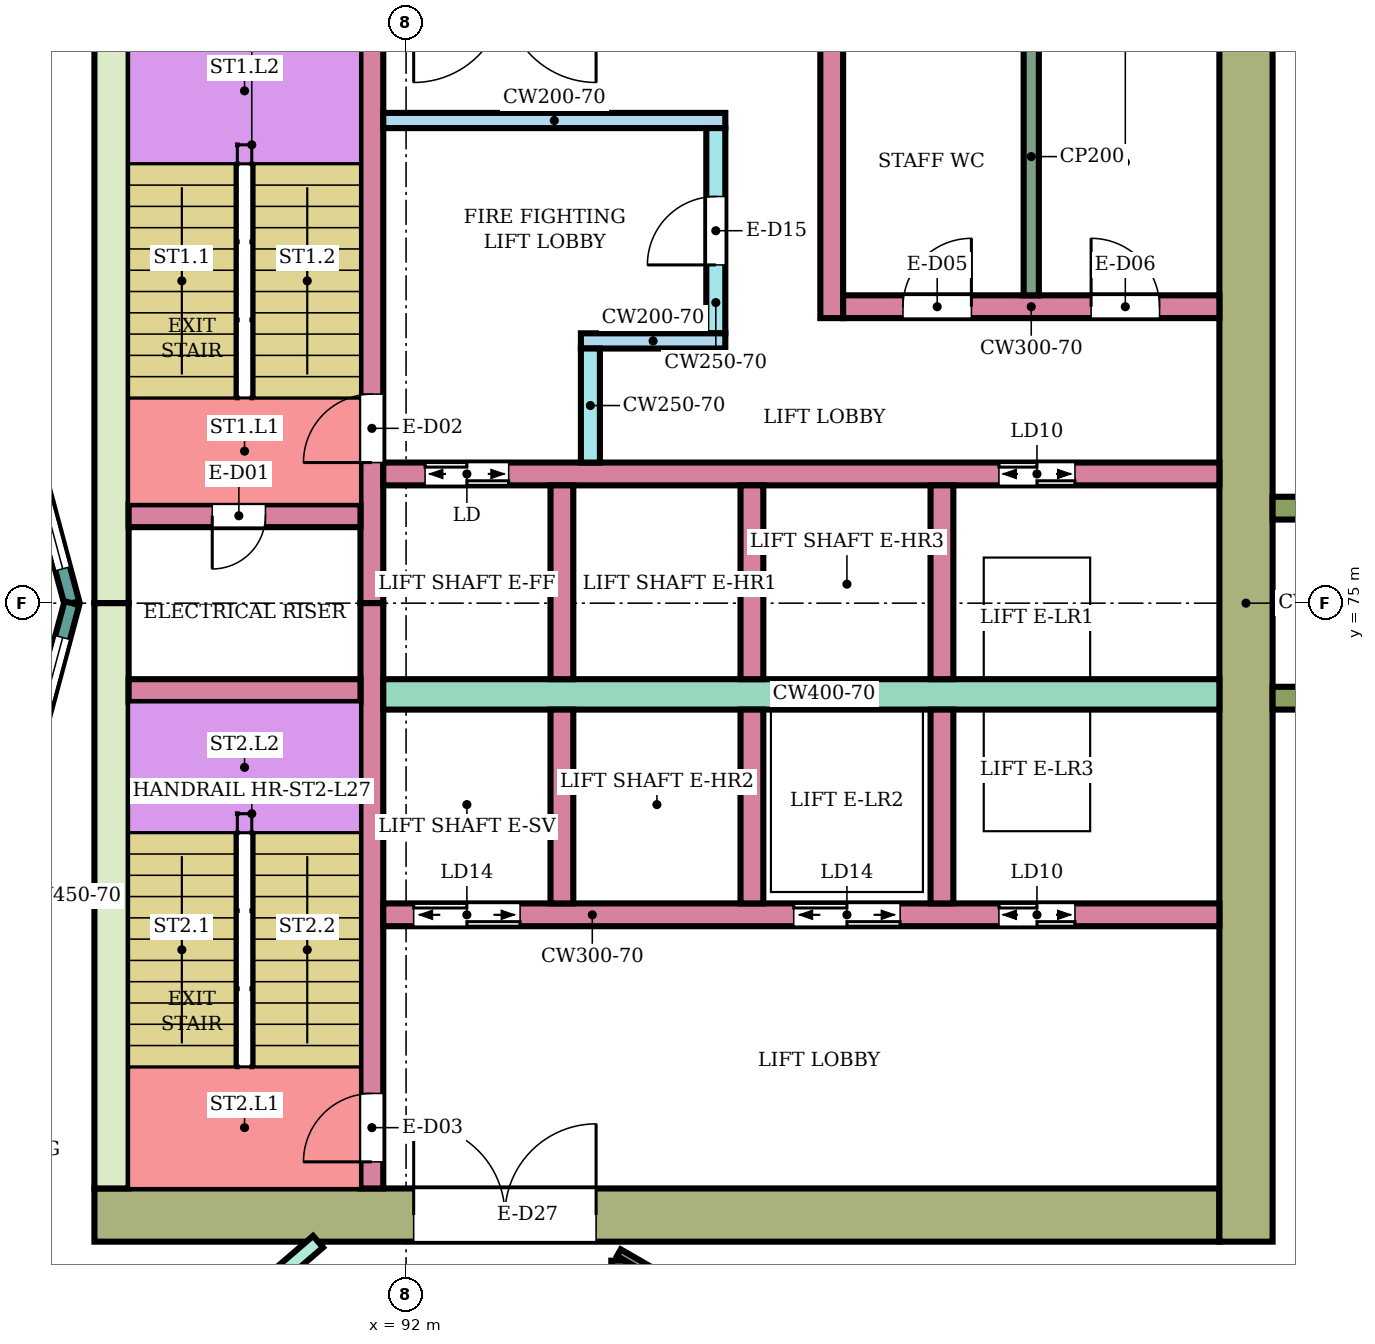
"""IFC4 building model, lengths in metres.
Left out: names, types, materials, properties, quantities, classifications, styles, units other than length and angle.
Written with IfcOpenShell. Run it as: python <this file> out.ifc"""

import sys

from ifc_helpers import new_model, si_unit, direction, frame, frame_2d, origin, place, context, subcontext, project, spatial, rectangle, extrude, element, fill, save


model = new_model("IFC4")
c1 = context("Model", 3, precision=1e-05, world=origin(), true_north=direction((0.0, 1.0)))
c2 = subcontext(c1, "Body", "Model", "MODEL_VIEW")
j1 = project(units=[si_unit("LENGTHUNIT", "METRE"), si_unit("PLANEANGLEUNIT", "RADIAN")], contexts=[c1])
p1 = place(None, origin())
s1 = spatial("IfcSite", under=j1, at=p1, CompositionType="ELEMENT")
p2 = place(p1, origin())
s2 = spatial("IfcBuilding", under=s1, at=p2, CompositionType="ELEMENT")
p3 = place(p2, frame((0.0, 0.0, 118.5)))
s3 = spatial("IfcBuildingStorey", under=s2, at=p3, CompositionType="ELEMENT", Elevation=118.5)
p4 = place(p3, frame((87.9, 66.95, 0.0), z_axis=(0.0, 0.0, 1.0), x_axis=(1.0, 0.0, 0.0)))
e1 = element("IfcWall", 1, at=p4, inside=s3, PredefinedType="SHEAR", context=c2, shape_type="SweptSolid", body=[
    extrude(rectangle(XDim=14.8, YDim=0.7, at=frame_2d((7.4, 0.0))), origin(), (0.0, 0.0, 1.0), 3.58),
])
p5 = place(p4, frame((4.2, 0.0, 0.0)))
e2 = element("IfcOpeningElement", 2, at=p5, cuts=e1, PredefinedType="OPENING", context=c2, shape_type="SweptSolid", body=[
    extrude(rectangle(XDim=2.4, YDim=2.4, at=frame_2d((1.2, 1.2))), frame((0.0, 0.36, 0.0), z_axis=(0.0, -1.0, 0.0), x_axis=(1.0, 0.0, 0.0)), (0.0, 0.0, 1.0), 0.72),
])
for number, where, z_axis, x_axis in (
    (3, (88.125, 75.0, 0.0), (0.0, 0.0, 1.0), (0.0, 1.0, 0.0)),
    (4, (88.125, 67.3, 0.0), (0.0, 0.0, 1.0), (0.0, 1.0, 0.0)),
):
    element("IfcWall", number, at=place(p3, frame(where, z_axis=z_axis, x_axis=x_axis)), inside=s3, PredefinedType="SHEAR", context=c2, shape_type="SweptSolid", body=[
        extrude(rectangle(XDim=7.7, YDim=0.45, at=frame_2d((3.85, 0.0))), origin(), (0.0, 0.0, 1.0), 3.58),
    ])
p6 = place(p3, frame((103.05, 66.6, 0.0), z_axis=(0.0, 0.0, 1.0), x_axis=(0.0, 1.0, 0.0)))
e5 = element("IfcWall", 5, at=p6, inside=s3, PredefinedType="SHEAR", context=c2, shape_type="SweptSolid", body=[
    extrude(rectangle(XDim=16.8, YDim=0.7, at=frame_2d((8.4, 0.0))), origin(), (0.0, 0.0, 1.0), 3.58),
])
p7 = place(p3, frame((91.55, 75.0, 0.0), z_axis=(0.0, 0.0, 1.0), x_axis=(0.0, 1.0, 0.0)))
e6 = element("IfcWall", 6, at=p7, inside=s3, PredefinedType="SHEAR", context=c2, shape_type="SweptSolid", body=[
    extrude(rectangle(XDim=7.7, YDim=0.3, at=frame_2d((3.85, 0.0))), origin(), (0.0, 0.0, 1.0), 3.58),
])
p8 = place(p7, frame((1.85, 0.0, 0.0)))
e7 = element("IfcOpeningElement", 7, at=p8, cuts=e6, PredefinedType="OPENING", context=c2, shape_type="SweptSolid", body=[
    extrude(rectangle(XDim=0.9, YDim=2.1, at=frame_2d((0.45, 1.05))), frame((0.0, 0.16, 0.0), z_axis=(0.0, -1.0, 0.0), x_axis=(1.0, 0.0, 0.0)), (0.0, 0.0, 1.0), 0.32),
])
p9 = place(p3, frame((91.55, 67.3, 0.0), z_axis=(0.0, 0.0, 1.0), x_axis=(0.0, 1.0, 0.0)))
e8 = element("IfcWall", 8, at=p9, inside=s3, PredefinedType="SHEAR", context=c2, shape_type="SweptSolid", body=[
    extrude(rectangle(XDim=7.7, YDim=0.3, at=frame_2d((3.85, 0.0))), origin(), (0.0, 0.0, 1.0), 3.58),
])
p10 = place(p9, frame((0.35, 0.0, 0.0)))
e9 = element("IfcOpeningElement", 9, at=p10, cuts=e8, PredefinedType="OPENING", context=c2, shape_type="SweptSolid", body=[
    extrude(rectangle(XDim=0.9, YDim=2.1, at=frame_2d((0.45, 1.05))), frame((0.0, 0.16, 0.0), z_axis=(0.0, -1.0, 0.0), x_axis=(1.0, 0.0, 0.0)), (0.0, 0.0, 1.0), 0.32),
])
p11 = place(p3, frame((88.35, 76.15, 0.0), z_axis=(0.0, 0.0, 1.0), x_axis=(1.0, 0.0, 0.0)))
e10 = element("IfcWall", 10, at=p11, inside=s3, PredefinedType="SHEAR", context=c2, shape_type="SweptSolid", body=[
    extrude(rectangle(XDim=3.05, YDim=0.3, at=frame_2d((1.525, 0.0))), origin(), (0.0, 0.0, 1.0), 3.58),
])
p12 = place(p11, frame((1.1, 0.0, 0.0)))
e11 = element("IfcOpeningElement", 11, at=p12, cuts=e10, PredefinedType="OPENING", context=c2, shape_type="SweptSolid", body=[
    extrude(rectangle(XDim=0.7, YDim=2.0, at=frame_2d((0.35, 1.0))), frame((0.0, 0.16, 0.0), z_axis=(0.0, -1.0, 0.0), x_axis=(1.0, 0.0, 0.0)), (0.0, 0.0, 1.0), 0.32),
])
p13 = place(p3, frame((88.35, 73.85, 0.0), z_axis=(0.0, 0.0, 1.0), x_axis=(1.0, 0.0, 0.0)))
e12 = element("IfcWall", 12, at=p13, inside=s3, PredefinedType="SHEAR", context=c2, shape_type="SweptSolid", body=[
    extrude(rectangle(XDim=3.05, YDim=0.3, at=frame_2d((1.525, 0.0))), origin(), (0.0, 0.0, 1.0), 3.58),
])
p14 = place(p3, frame((91.7, 76.7, 0.0), z_axis=(0.0, 0.0, 1.0), x_axis=(1.0, 0.0, 0.0)))
e13 = element("IfcWall", 13, at=p14, inside=s3, PredefinedType="SHEAR", context=c2, shape_type="SweptSolid", body=[
    extrude(rectangle(XDim=11.0, YDim=0.3, at=frame_2d((5.5, 0.0))), origin(), (0.0, 0.0, 1.0), 3.58),
])
p15 = place(p14, frame((0.55, 0.0, 0.0)))
e14 = element("IfcOpeningElement", 14, at=p15, cuts=e13, PredefinedType="OPENING", context=c2, shape_type="SweptSolid", body=[
    extrude(rectangle(XDim=1.1, YDim=2.1, at=frame_2d((0.55, 1.05))), frame((0.0, 0.16, 0.0), z_axis=(0.0, -1.0, 0.0), x_axis=(1.0, 0.0, 0.0)), (0.0, 0.0, 1.0), 0.32),
])
p16 = place(p14, frame((8.1, 0.0, 0.0)))
e15 = element("IfcOpeningElement", 15, at=p16, cuts=e13, PredefinedType="OPENING", context=c2, shape_type="SweptSolid", body=[
    extrude(rectangle(XDim=1.0, YDim=2.1, at=frame_2d((0.5, 1.05))), frame((0.0, 0.16, 0.0), z_axis=(0.0, -1.0, 0.0), x_axis=(1.0, 0.0, 0.0)), (0.0, 0.0, 1.0), 0.32),
])
p17 = place(p3, frame((91.7, 73.8, 0.0), z_axis=(0.0, 0.0, 1.0), x_axis=(1.0, 0.0, 0.0)))
e16 = element("IfcWall", 16, at=p17, inside=s3, PredefinedType="SHEAR", context=c2, shape_type="SweptSolid", body=[
    extrude(rectangle(XDim=11.0, YDim=0.4, at=frame_2d((5.5, 0.0))), origin(), (0.0, 0.0, 1.0), 3.58),
])
p18 = place(p3, frame((91.7, 70.9, 0.0), z_axis=(0.0, 0.0, 1.0), x_axis=(1.0, 0.0, 0.0)))
e17 = element("IfcWall", 17, at=p18, inside=s3, PredefinedType="SHEAR", context=c2, shape_type="SweptSolid", body=[
    extrude(rectangle(XDim=11.0, YDim=0.3, at=frame_2d((5.5, 0.0))), origin(), (0.0, 0.0, 1.0), 3.58),
])
p19 = place(p18, frame((0.4, 0.0, 0.0)))
e18 = element("IfcOpeningElement", 18, at=p19, cuts=e17, PredefinedType="OPENING", context=c2, shape_type="SweptSolid", body=[
    extrude(rectangle(XDim=1.4, YDim=2.1, at=frame_2d((0.7, 1.05))), frame((0.0, 0.16, 0.0), z_axis=(0.0, -1.0, 0.0), x_axis=(1.0, 0.0, 0.0)), (0.0, 0.0, 1.0), 0.32),
])
p20 = place(p18, frame((5.4, 0.0, 0.0)))
e19 = element("IfcOpeningElement", 19, at=p20, cuts=e17, PredefinedType="OPENING", context=c2, shape_type="SweptSolid", body=[
    extrude(rectangle(XDim=1.4, YDim=2.1, at=frame_2d((0.7, 1.05))), frame((0.0, 0.16, 0.0), z_axis=(0.0, -1.0, 0.0), x_axis=(1.0, 0.0, 0.0)), (0.0, 0.0, 1.0), 0.32),
])
p21 = place(p18, frame((8.1, 0.0, 0.0)))
e20 = element("IfcOpeningElement", 20, at=p21, cuts=e17, PredefinedType="OPENING", context=c2, shape_type="SweptSolid", body=[
    extrude(rectangle(XDim=1.0, YDim=2.1, at=frame_2d((0.5, 1.05))), frame((0.0, 0.16, 0.0), z_axis=(0.0, -1.0, 0.0), x_axis=(1.0, 0.0, 0.0)), (0.0, 0.0, 1.0), 0.32),
])
for number, where, z_axis, x_axis in (
    (21, (94.05, 74.0, 0.0), (0.0, 0.0, 1.0), (0.0, 1.0, 0.0)),
    (22, (96.55, 74.0, 0.0), (0.0, 0.0, 1.0), (0.0, 1.0, 0.0)),
    (23, (99.05, 74.0, 0.0), (0.0, 0.0, 1.0), (0.0, 1.0, 0.0)),
    (24, (94.05, 71.05, 0.0), (0.0, 0.0, 1.0), (0.0, 1.0, 0.0)),
    (25, (96.55, 71.05, 0.0), (0.0, 0.0, 1.0), (0.0, 1.0, 0.0)),
    (26, (99.05, 71.05, 0.0), (0.0, 0.0, 1.0), (0.0, 1.0, 0.0)),
):
    element("IfcWall", number, at=place(p3, frame(where, z_axis=z_axis, x_axis=x_axis)), inside=s3, PredefinedType="SHEAR", context=c2, shape_type="SweptSolid", body=[
        extrude(rectangle(XDim=2.55, YDim=0.3, at=frame_2d((1.275, 0.0))), origin(), (0.0, 0.0, 1.0), 3.58),
    ])
p22 = place(p3, frame((91.7, 81.35, 0.0), z_axis=(0.0, 0.0, 1.0), x_axis=(1.0, 0.0, 0.0)))
e27 = element("IfcWall", 27, at=p22, inside=s3, PredefinedType="SHEAR", context=c2, shape_type="SweptSolid", body=[
    extrude(rectangle(XDim=4.5, YDim=0.2, at=frame_2d((2.25, 0.0))), origin(), (0.0, 0.0, 1.0), 3.58),
])
p23 = place(p3, frame((96.075, 78.55, 0.0), z_axis=(0.0, 0.0, 1.0), x_axis=(0.0, 1.0, 0.0)))
e28 = element("IfcWall", 28, at=p23, inside=s3, PredefinedType="SHEAR", context=c2, shape_type="SweptSolid", body=[
    extrude(rectangle(XDim=2.7, YDim=0.25, at=frame_2d((1.35, 0.0))), origin(), (0.0, 0.0, 1.0), 3.58),
])
p24 = place(p23, frame((0.9, 0.0, 0.0)))
e29 = element("IfcOpeningElement", 29, at=p24, cuts=e28, PredefinedType="OPENING", context=c2, shape_type="SweptSolid", body=[
    extrude(rectangle(XDim=0.9, YDim=2.1, at=frame_2d((0.45, 1.05))), frame((0.0, 0.135, 0.0), z_axis=(0.0, -1.0, 0.0), x_axis=(1.0, 0.0, 0.0)), (0.0, 0.0, 1.0), 0.27),
])
p25 = place(p3, frame((94.3, 78.45, 0.0), z_axis=(0.0, 0.0, 1.0), x_axis=(1.0, 0.0, 0.0)))
e30 = element("IfcWall", 30, at=p25, inside=s3, PredefinedType="SHEAR", context=c2, shape_type="SweptSolid", body=[
    extrude(rectangle(XDim=1.9, YDim=0.2, at=frame_2d((0.95, 0.0))), origin(), (0.0, 0.0, 1.0), 3.58),
])
p26 = place(p3, frame((94.425, 76.85, 0.0), z_axis=(0.0, 0.0, 1.0), x_axis=(0.0, 1.0, 0.0)))
e31 = element("IfcWall", 31, at=p26, inside=s3, PredefinedType="SHEAR", context=c2, shape_type="SweptSolid", body=[
    extrude(rectangle(XDim=1.5, YDim=0.25, at=frame_2d((0.75, 0.0))), origin(), (0.0, 0.0, 1.0), 3.58),
])
p27 = place(p3, frame((97.6, 78.75, 0.0), z_axis=(0.0, 0.0, 1.0), x_axis=(0.0, 1.0, 0.0)))
e32 = element("IfcWall", 32, at=p27, inside=s3, PredefinedType="SHEAR", context=c2, shape_type="SweptSolid", body=[
    extrude(rectangle(XDim=3.95, YDim=0.3, at=frame_2d((1.975, 0.0))), origin(), (0.0, 0.0, 1.0), 3.58),
])
p28 = place(p3, frame((97.75, 78.9, 0.0), z_axis=(0.0, 0.0, 1.0), x_axis=(1.0, 0.0, 0.0)))
e33 = element("IfcWall", 33, at=p28, inside=s3, PredefinedType="SHEAR", context=c2, shape_type="SweptSolid", body=[
    extrude(rectangle(XDim=4.95, YDim=0.3, at=frame_2d((2.475, 0.0))), origin(), (0.0, 0.0, 1.0), 3.58),
])
p29 = place(p28, frame((0.788, 0.0, 0.0)))
e34 = element("IfcOpeningElement", 34, at=p29, cuts=e33, PredefinedType="OPENING", context=c2, shape_type="SweptSolid", body=[
    extrude(rectangle(XDim=0.9, YDim=2.1, at=frame_2d((0.45, 1.05))), frame((0.0, 0.16, 0.0), z_axis=(0.0, -1.0, 0.0), x_axis=(1.0, 0.0, 0.0)), (0.0, 0.0, 1.0), 0.32),
])
p30 = place(p28, frame((3.262, 0.0, 0.0)))
e35 = element("IfcOpeningElement", 35, at=p30, cuts=e33, PredefinedType="OPENING", context=c2, shape_type="SweptSolid", body=[
    extrude(rectangle(XDim=0.9, YDim=2.1, at=frame_2d((0.45, 1.05))), frame((0.0, 0.16, 0.0), z_axis=(0.0, -1.0, 0.0), x_axis=(1.0, 0.0, 0.0)), (0.0, 0.0, 1.0), 0.32),
])
for number, where, z_axis, x_axis in (
    (36, (103.4, 73.75, 0.0), (0.0, 0.0, 1.0), (1.0, 0.0, 0.0)),
    (37, (103.4, 76.25, 0.0), (0.0, 0.0, 1.0), (1.0, 0.0, 0.0)),
):
    element("IfcWall", number, at=place(p3, frame(where, z_axis=z_axis, x_axis=x_axis)), inside=s3, PredefinedType="NOTDEFINED", context=c2, shape_type="SweptSolid", body=[
        extrude(rectangle(XDim=2.416, YDim=0.3, at=frame_2d((1.208, 0.0))), origin(), (0.0, 0.0, 1.0), 3.9),
    ])
p31 = place(p3, frame((87.604, 75.0, 0.0), z_axis=(0.0, 0.0, 1.0), x_axis=(-0.258789828301, 0.965933654434, 0.0)))
e38 = element("IfcWall", 38, at=p31, inside=s3, PredefinedType="NOTDEFINED", context=c2, shape_type="SweptSolid", body=[
    extrude(rectangle(XDim=3.936, YDim=0.2, at=frame_2d((1.968, 0.0))), origin(), (0.0, 0.0, 1.0), 3.9),
])
p32 = place(p31, frame((0.468, 0.0, 0.9)))
e39 = element("IfcOpeningElement", 39, at=p32, cuts=e38, PredefinedType="OPENING", context=c2, shape_type="SweptSolid", body=[
    extrude(rectangle(XDim=3.0, YDim=2.3, at=frame_2d((1.5, 1.15))), frame((0.0, 0.11, 0.0), z_axis=(0.0, -1.0, 0.0), x_axis=(1.0, 0.0, 0.0)), (0.0, 0.0, 1.0), 0.22),
])
p33 = place(p3, frame((86.585, 71.198, 0.0), z_axis=(0.0, 0.0, 1.0), x_axis=(0.258789828301, 0.965933654434, 0.0)))
e40 = element("IfcWall", 40, at=p33, inside=s3, PredefinedType="NOTDEFINED", context=c2, shape_type="SweptSolid", body=[
    extrude(rectangle(XDim=3.936, YDim=0.2, at=frame_2d((1.968, 0.0))), origin(), (0.0, 0.0, 1.0), 3.9),
])
p34 = place(p33, frame((0.468, 0.0, 0.9)))
e41 = element("IfcOpeningElement", 41, at=p34, cuts=e40, PredefinedType="OPENING", context=c2, shape_type="SweptSolid", body=[
    extrude(rectangle(XDim=3.0, YDim=2.3, at=frame_2d((1.5, 1.15))), frame((0.0, 0.11, 0.0), z_axis=(0.0, -1.0, 0.0), x_axis=(1.0, 0.0, 0.0)), (0.0, 0.0, 1.0), 0.22),
])
p35 = place(p3, frame((86.877, 63.189, 0.0), z_axis=(0.0, 0.0, 1.0), x_axis=(0.758075808328, 0.652166442581, 0.0)))
e42 = element("IfcWall", 42, at=p35, inside=s3, PredefinedType="PARTITIONING", context=c2, shape_type="SweptSolid", body=[
    extrude(rectangle(XDim=5.23, YDim=0.2, at=frame_2d((2.615, 0.0))), origin(), (0.0, 0.0, 1.0), 3.45),
])
p36 = place(p35, frame((2.165, 0.0, 0.0)))
e43 = element("IfcOpeningElement", 43, at=p36, cuts=e42, PredefinedType="OPENING", context=c2, shape_type="SweptSolid", body=[
    extrude(rectangle(XDim=0.9, YDim=2.1, at=frame_2d((0.45, 1.05))), frame((0.0, 0.11, 0.0), z_axis=(0.0, -1.0, 0.0), x_axis=(1.0, 0.0, 0.0)), (0.0, 0.0, 1.0), 0.22),
])
p37 = place(p3, frame((94.8, 65.1, 0.0), z_axis=(0.0, 0.0, 1.0), x_axis=(0.0, 1.0, 0.0)))
e44 = element("IfcWall", 44, at=p37, inside=s3, PredefinedType="PARTITIONING", context=c2, shape_type="SweptSolid", body=[
    extrude(rectangle(XDim=1.25, YDim=0.2, at=frame_2d((0.625, 0.0))), origin(), (0.0, 0.0, 1.0), 3.45),
])
p38 = place(p3, frame((94.8, 66.455, 0.0), z_axis=(0.0, 0.0, 1.0), x_axis=(0.86602264145, -0.500004784474, 0.0)))
e45 = element("IfcWall", 45, at=p38, inside=s3, PredefinedType="PARTITIONING", context=c2, shape_type="SweptSolid", body=[
    extrude(rectangle(XDim=8.708, YDim=0.1, at=frame_2d((4.354, 0.0))), origin(), (0.0, 0.0, 1.0), 3.45),
])
p39 = place(p38, frame((3.879, 0.0, 0.0)))
e46 = element("IfcOpeningElement", 46, at=p39, cuts=e45, PredefinedType="OPENING", context=c2, shape_type="SweptSolid", body=[
    extrude(rectangle(XDim=0.9, YDim=2.1, at=frame_2d((0.45, 1.05))), frame((0.0, 0.06, 0.0), z_axis=(0.0, -1.0, 0.0), x_axis=(1.0, 0.0, 0.0)), (0.0, 0.0, 1.0), 0.12),
])
p40 = place(p3, frame((100.225, 79.05, 0.0), z_axis=(0.0, 0.0, 1.0), x_axis=(0.0, 1.0, 0.0)))
e47 = element("IfcWall", 47, at=p40, inside=s3, PredefinedType="PARTITIONING", context=c2, shape_type="SweptSolid", body=[
    extrude(rectangle(XDim=3.65, YDim=0.2, at=frame_2d((1.825, 0.0))), origin(), (0.0, 0.0, 1.0), 3.58),
])
p41 = place(p32, origin())
e48 = element("IfcWindow", 48, at=p41, inside=s3, PartitioningType="SINGLE_PANEL", PredefinedType="WINDOW", context=c2, shape_type="SweptSolid", body=[
    extrude(rectangle(XDim=3.0, YDim=2.3, at=frame_2d((1.5, 1.15))), frame((0.0, 0.03, 0.0), z_axis=(0.0, -1.0, 0.0), x_axis=(1.0, 0.0, 0.0)), (0.0, 0.0, 1.0), 0.06),
])
fill(e39, e48)
p42 = place(p34, origin())
e49 = element("IfcWindow", 49, at=p42, inside=s3, PartitioningType="SINGLE_PANEL", PredefinedType="WINDOW", context=c2, shape_type="SweptSolid", body=[
    extrude(rectangle(XDim=3.0, YDim=2.3, at=frame_2d((1.5, 1.15))), frame((0.0, 0.03, 0.0), z_axis=(0.0, -1.0, 0.0), x_axis=(1.0, 0.0, 0.0)), (0.0, 0.0, 1.0), 0.06),
])
fill(e41, e49)
p43 = place(p12, frame((0.7, 0.0, 0.0), z_axis=(0.0, 0.0, 1.0), x_axis=(-1.0, 0.0, 0.0)))
e50 = element("IfcDoor", 50, at=p43, inside=s3, OperationType="SINGLE_SWING_RIGHT", PredefinedType="DOOR", context=c2, shape_type="SweptSolid", body=[
    extrude(rectangle(XDim=0.7, YDim=2.0, at=frame_2d((0.35, 1.0))), frame((0.0, 0.025, 0.0), z_axis=(0.0, -1.0, 0.0), x_axis=(1.0, 0.0, 0.0)), (0.0, 0.0, 1.0), 0.05),
])
fill(e11, e50)
p44 = place(p8, origin())
e51 = element("IfcDoor", 51, at=p44, inside=s3, OperationType="SINGLE_SWING_LEFT", PredefinedType="DOOR", context=c2, shape_type="SweptSolid", body=[
    extrude(rectangle(XDim=0.9, YDim=2.1, at=frame_2d((0.45, 1.05))), frame((0.0, 0.025, 0.0), z_axis=(0.0, -1.0, 0.0), x_axis=(1.0, 0.0, 0.0)), (0.0, 0.0, 1.0), 0.05),
])
fill(e7, e51)
p45 = place(p10, origin())
e52 = element("IfcDoor", 52, at=p45, inside=s3, OperationType="SINGLE_SWING_LEFT", PredefinedType="DOOR", context=c2, shape_type="SweptSolid", body=[
    extrude(rectangle(XDim=0.9, YDim=2.1, at=frame_2d((0.45, 1.05))), frame((0.0, 0.025, 0.0), z_axis=(0.0, -1.0, 0.0), x_axis=(1.0, 0.0, 0.0)), (0.0, 0.0, 1.0), 0.05),
])
fill(e9, e52)
p46 = place(p15, origin())
e53 = element("IfcDoor", 53, at=p46, inside=s3, OperationType="DOUBLE_DOOR_SLIDING", PredefinedType="DOOR", context=c2, shape_type="SweptSolid", body=[
    extrude(rectangle(XDim=1.1, YDim=2.1, at=frame_2d((0.55, 1.05))), frame((0.0, 0.025, 0.0), z_axis=(0.0, -1.0, 0.0), x_axis=(1.0, 0.0, 0.0)), (0.0, 0.0, 1.0), 0.05),
])
fill(e14, e53)
p47 = place(p16, origin())
e54 = element("IfcDoor", 54, at=p47, inside=s3, OperationType="DOUBLE_DOOR_SLIDING", PredefinedType="DOOR", context=c2, shape_type="SweptSolid", body=[
    extrude(rectangle(XDim=1.0, YDim=2.1, at=frame_2d((0.5, 1.05))), frame((0.0, 0.025, 0.0), z_axis=(0.0, -1.0, 0.0), x_axis=(1.0, 0.0, 0.0)), (0.0, 0.0, 1.0), 0.05),
])
fill(e15, e54)
p48 = place(p19, origin())
e55 = element("IfcDoor", 55, at=p48, inside=s3, OperationType="DOUBLE_DOOR_SLIDING", PredefinedType="DOOR", context=c2, shape_type="SweptSolid", body=[
    extrude(rectangle(XDim=1.4, YDim=2.1, at=frame_2d((0.7, 1.05))), frame((0.0, 0.025, 0.0), z_axis=(0.0, -1.0, 0.0), x_axis=(1.0, 0.0, 0.0)), (0.0, 0.0, 1.0), 0.05),
])
fill(e18, e55)
p49 = place(p20, origin())
e56 = element("IfcDoor", 56, at=p49, inside=s3, OperationType="DOUBLE_DOOR_SLIDING", PredefinedType="DOOR", context=c2, shape_type="SweptSolid", body=[
    extrude(rectangle(XDim=1.4, YDim=2.1, at=frame_2d((0.7, 1.05))), frame((0.0, 0.025, 0.0), z_axis=(0.0, -1.0, 0.0), x_axis=(1.0, 0.0, 0.0)), (0.0, 0.0, 1.0), 0.05),
])
fill(e19, e56)
p50 = place(p21, origin())
e57 = element("IfcDoor", 57, at=p50, inside=s3, OperationType="DOUBLE_DOOR_SLIDING", PredefinedType="DOOR", context=c2, shape_type="SweptSolid", body=[
    extrude(rectangle(XDim=1.0, YDim=2.1, at=frame_2d((0.5, 1.05))), frame((0.0, 0.025, 0.0), z_axis=(0.0, -1.0, 0.0), x_axis=(1.0, 0.0, 0.0)), (0.0, 0.0, 1.0), 0.05),
])
fill(e20, e57)
p51 = place(p24, origin())
e58 = element("IfcDoor", 58, at=p51, inside=s3, OperationType="SINGLE_SWING_LEFT", PredefinedType="DOOR", context=c2, shape_type="SweptSolid", body=[
    extrude(rectangle(XDim=0.9, YDim=2.1, at=frame_2d((0.45, 1.05))), frame((0.0, 0.025, 0.0), z_axis=(0.0, -1.0, 0.0), x_axis=(1.0, 0.0, 0.0)), (0.0, 0.0, 1.0), 0.05),
])
fill(e29, e58)
p52 = place(p29, origin())
e59 = element("IfcDoor", 59, at=p52, inside=s3, OperationType="SINGLE_SWING_RIGHT", PredefinedType="DOOR", context=c2, shape_type="SweptSolid", body=[
    extrude(rectangle(XDim=0.9, YDim=2.1, at=frame_2d((0.45, 1.05))), frame((0.0, 0.025, 0.0), z_axis=(0.0, -1.0, 0.0), x_axis=(1.0, 0.0, 0.0)), (0.0, 0.0, 1.0), 0.05),
])
fill(e34, e59)
p53 = place(p30, origin())
e60 = element("IfcDoor", 60, at=p53, inside=s3, OperationType="SINGLE_SWING_LEFT", PredefinedType="DOOR", context=c2, shape_type="SweptSolid", body=[
    extrude(rectangle(XDim=0.9, YDim=2.1, at=frame_2d((0.45, 1.05))), frame((0.0, 0.025, 0.0), z_axis=(0.0, -1.0, 0.0), x_axis=(1.0, 0.0, 0.0)), (0.0, 0.0, 1.0), 0.05),
])
fill(e35, e60)
p54 = place(p5, origin())
e61 = element("IfcDoor", 61, at=p54, inside=s3, OperationType="DOUBLE_DOOR_SINGLE_SWING", PredefinedType="DOOR", context=c2, shape_type="SweptSolid", body=[
    extrude(rectangle(XDim=2.4, YDim=2.4, at=frame_2d((1.2, 1.2))), frame((0.0, 0.025, 0.0), z_axis=(0.0, -1.0, 0.0), x_axis=(1.0, 0.0, 0.0)), (0.0, 0.0, 1.0), 0.05),
])
fill(e2, e61)
save(model, sys.argv[1])
